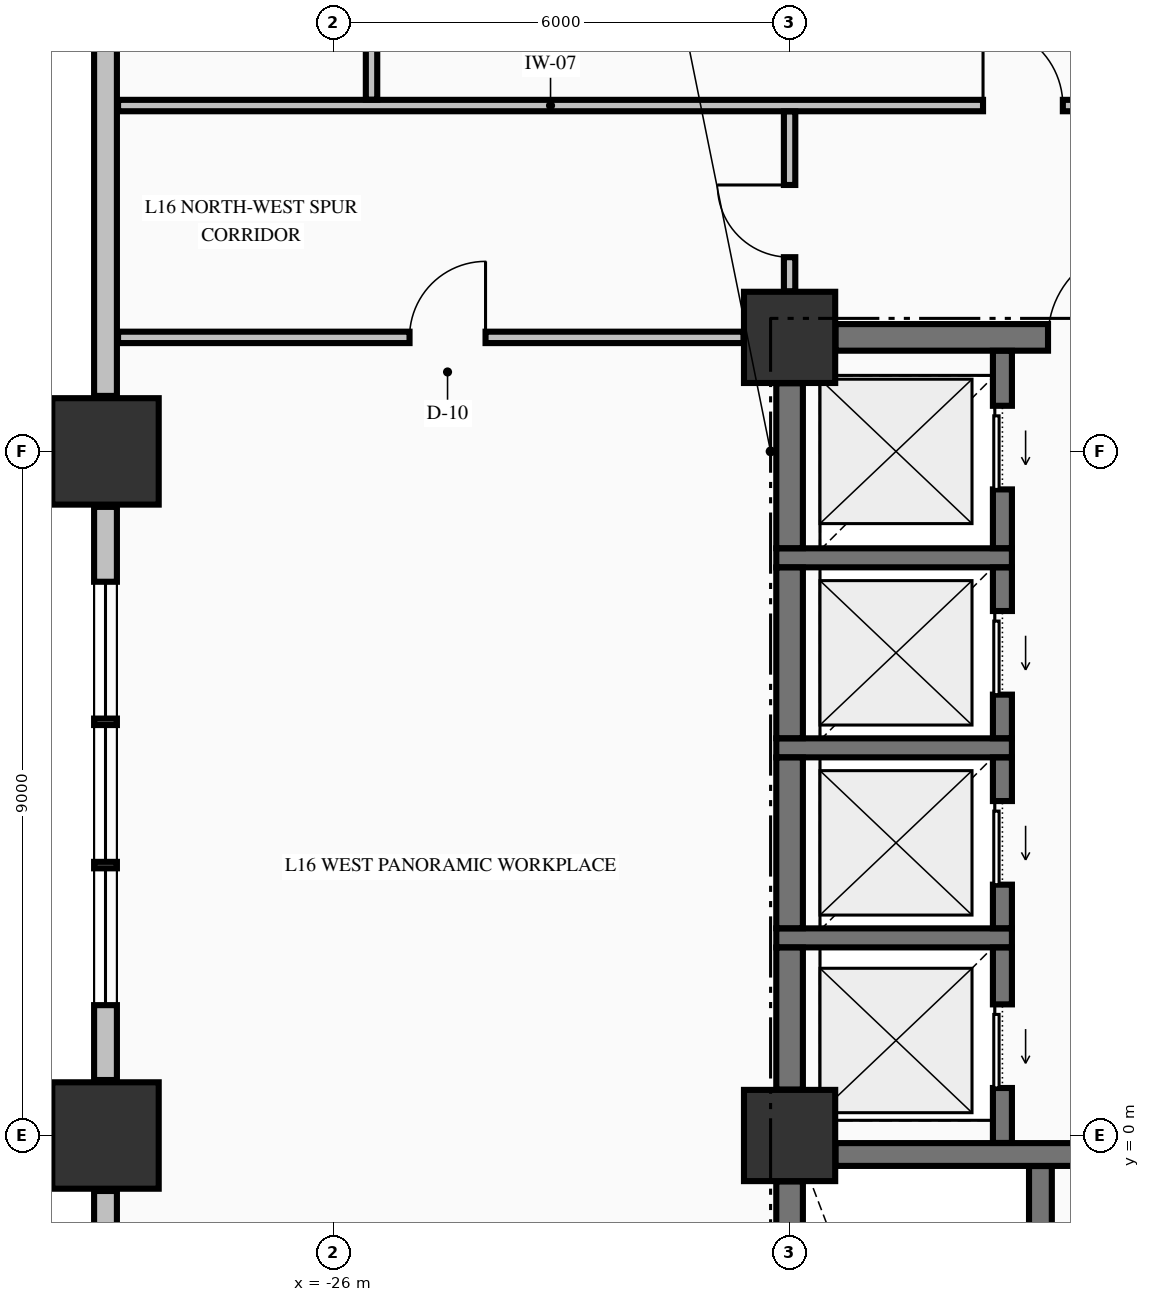
"""IFC4 building model, lengths in metres.
Left out: names, types, materials, properties, quantities, classifications, styles, units other than length and angle.
Written with IfcOpenShell. Run it as: python <this file> out.ifc"""

import sys

from ifc_helpers import new_model, si_unit, direction, frame, frame_2d, origin, origin_2d, place, context, subcontext, project, spatial, rectangle, extrude, element, fill, save


model = new_model("IFC4")
c1 = context("Model", 3, precision=1e-05, world=origin(), true_north=direction((0.0, 1.0)))
c2 = subcontext(c1, "Body", "Model", "MODEL_VIEW")
j1 = project(units=[si_unit("LENGTHUNIT", "METRE"), si_unit("PLANEANGLEUNIT", "RADIAN")], contexts=[c1])
p1 = place(None, origin())
s1 = spatial("IfcSite", under=j1, at=p1, CompositionType="ELEMENT")
p2 = place(p1, origin())
s2 = spatial("IfcBuilding", under=s1, at=p2, CompositionType="ELEMENT")
p3 = place(p2, frame((0.0, 0.0, 67.9)))
s3 = spatial("IfcBuildingStorey", under=s2, at=p3, CompositionType="ELEMENT", Elevation=67.9)
for number, where, z_axis, x_axis in (
    (1, (-29.0, 0.0, -0.25), (0.0, 0.0, 1.0), (1.0, 0.0, 0.0)),
    (2, (-29.0, 9.0, -0.25), (0.0, 0.0, 1.0), (1.0, 0.0, 0.0)),
):
    element("IfcColumn", number, at=place(p3, frame(where, z_axis=z_axis, x_axis=x_axis)), inside=s3, PredefinedType="COLUMN", context=c2, shape_type="SweptSolid", body=[
        extrude(rectangle(XDim=1.4, YDim=1.4, at=origin_2d()), origin(), (0.0, 0.0, 1.0), 3.495),
    ])
for number, where, z_axis, x_axis in (
    (3, (-20.0, 10.5, -0.25), (0.0, 0.0, 1.0), (1.0, 0.0, 0.0)),
    (4, (-20.0, 0.0, -0.25), (0.0, 0.0, 1.0), (1.0, 0.0, 0.0)),
):
    element("IfcColumn", number, at=place(p3, frame(where, z_axis=z_axis, x_axis=x_axis)), inside=s3, PredefinedType="COLUMN", context=c2, shape_type="SweptSolid", body=[
        extrude(rectangle(XDim=1.2, YDim=1.2, at=origin_2d()), origin(), (0.0, 0.0, 1.0), 3.495),
    ])
p4 = place(p3, frame((-29.0, -0.73, 0.0), z_axis=(0.0, 0.0, 1.0), x_axis=(0.0, -1.0, 0.0)))
e5 = element("IfcWall", 5, at=p4, inside=s3, PredefinedType="STANDARD", context=c2, shape_type="SweptSolid", body=[
    extrude(rectangle(XDim=7.54, YDim=0.3, at=frame_2d((3.77, 0.0))), origin(), (0.0, 0.0, 1.0), 2.637),
])
p5 = place(p4, frame((0.985, 0.0, 0.78)))
e6 = element("IfcOpeningElement", 6, at=p5, cuts=e5, PredefinedType="OPENING", context=c2, shape_type="SweptSolid", body=[
    extrude(rectangle(XDim=1.8, YDim=1.72, at=frame_2d((0.9, 0.86))), frame((0.0, 0.16, 0.0), z_axis=(0.0, -1.0, 0.0), x_axis=(1.0, 0.0, 0.0)), (0.0, 0.0, 1.0), 0.32),
])
p6 = place(p4, frame((2.87, 0.0, 0.78)))
e7 = element("IfcOpeningElement", 7, at=p6, cuts=e5, PredefinedType="OPENING", context=c2, shape_type="SweptSolid", body=[
    extrude(rectangle(XDim=1.8, YDim=1.72, at=frame_2d((0.9, 0.86))), frame((0.0, 0.16, 0.0), z_axis=(0.0, -1.0, 0.0), x_axis=(1.0, 0.0, 0.0)), (0.0, 0.0, 1.0), 0.32),
])
p7 = place(p4, frame((4.755, 0.0, 0.78)))
e8 = element("IfcOpeningElement", 8, at=p7, cuts=e5, PredefinedType="OPENING", context=c2, shape_type="SweptSolid", body=[
    extrude(rectangle(XDim=1.8, YDim=1.72, at=frame_2d((0.9, 0.86))), frame((0.0, 0.16, 0.0), z_axis=(0.0, -1.0, 0.0), x_axis=(1.0, 0.0, 0.0)), (0.0, 0.0, 1.0), 0.32),
])
p8 = place(p3, frame((-29.0, 8.27, 0.0), z_axis=(0.0, 0.0, 1.0), x_axis=(0.0, -1.0, 0.0)))
e9 = element("IfcWall", 9, at=p8, inside=s3, PredefinedType="STANDARD", context=c2, shape_type="SweptSolid", body=[
    extrude(rectangle(XDim=7.54, YDim=0.3, at=frame_2d((3.77, 0.0))), origin(), (0.0, 0.0, 1.0), 2.637),
])
p9 = place(p8, frame((0.985, 0.0, 0.78)))
e10 = element("IfcOpeningElement", 10, at=p9, cuts=e9, PredefinedType="OPENING", context=c2, shape_type="SweptSolid", body=[
    extrude(rectangle(XDim=1.8, YDim=1.72, at=frame_2d((0.9, 0.86))), frame((0.0, 0.16, 0.0), z_axis=(0.0, -1.0, 0.0), x_axis=(1.0, 0.0, 0.0)), (0.0, 0.0, 1.0), 0.32),
])
p10 = place(p8, frame((2.87, 0.0, 0.78)))
e11 = element("IfcOpeningElement", 11, at=p10, cuts=e9, PredefinedType="OPENING", context=c2, shape_type="SweptSolid", body=[
    extrude(rectangle(XDim=1.8, YDim=1.72, at=frame_2d((0.9, 0.86))), frame((0.0, 0.16, 0.0), z_axis=(0.0, -1.0, 0.0), x_axis=(1.0, 0.0, 0.0)), (0.0, 0.0, 1.0), 0.32),
])
p11 = place(p8, frame((4.755, 0.0, 0.78)))
e12 = element("IfcOpeningElement", 12, at=p11, cuts=e9, PredefinedType="OPENING", context=c2, shape_type="SweptSolid", body=[
    extrude(rectangle(XDim=1.8, YDim=1.72, at=frame_2d((0.9, 0.86))), frame((0.0, 0.16, 0.0), z_axis=(0.0, -1.0, 0.0), x_axis=(1.0, 0.0, 0.0)), (0.0, 0.0, 1.0), 0.32),
])
p12 = place(p3, frame((-29.0, 22.27, 0.0), z_axis=(0.0, 0.0, 1.0), x_axis=(0.0, -1.0, 0.0)))
e13 = element("IfcWall", 13, at=p12, inside=s3, PredefinedType="STANDARD", context=c2, shape_type="SweptSolid", body=[
    extrude(rectangle(XDim=12.54, YDim=0.3, at=frame_2d((6.27, 0.0))), origin(), (0.0, 0.0, 1.0), 2.637),
])
p13 = place(p3, frame((-19.396, -0.25, 0.0), z_axis=(0.0, 0.0, 1.0), x_axis=(1.0, 0.0, 0.0)))
e14 = element("IfcWall", 14, at=p13, inside=s3, PredefinedType="SHEAR", context=c2, shape_type="SweptSolid", body=[
    extrude(rectangle(XDim=7.792, YDim=0.3, at=frame_2d((3.896, 0.0))), origin(), (0.0, 0.0, 1.0), 3.245),
])
p14 = place(p13, frame((5.696, 0.0, 0.0)))
e15 = element("IfcOpeningElement", 15, at=p14, cuts=e14, PredefinedType="OPENING", context=c2, shape_type="SweptSolid", body=[
    extrude(rectangle(XDim=1.1, YDim=2.15, at=frame_2d((0.55, 1.075))), frame((0.0, 0.16, 0.0), z_axis=(0.0, -1.0, 0.0), x_axis=(1.0, 0.0, 0.0)), (0.0, 0.0, 1.0), 0.32),
])
for number, where, z_axis, x_axis in (
    (16, (-20.175, 2.6, 0.0), (0.0, 0.0, 1.0), (1.0, 0.0, 0.0)),
    (17, (-20.175, 5.1, 0.0), (0.0, 0.0, 1.0), (1.0, 0.0, 0.0)),
    (18, (-20.175, 7.6, 0.0), (0.0, 0.0, 1.0), (1.0, 0.0, 0.0)),
):
    element("IfcWall", number, at=place(p3, frame(where, z_axis=z_axis, x_axis=x_axis)), inside=s3, PredefinedType="SOLIDWALL", context=c2, shape_type="SweptSolid", body=[
        extrude(rectangle(XDim=3.1, YDim=0.25, at=frame_2d((1.55, 0.0))), origin(), (0.0, 0.0, 1.0), 3.245),
    ])
p15 = place(p3, frame((-19.396, 10.5, 0.0), z_axis=(0.0, 0.0, 1.0), x_axis=(1.0, 0.0, 0.0)))
e19 = element("IfcWall", 19, at=p15, inside=s3, PredefinedType="SHEAR", context=c2, shape_type="SweptSolid", body=[
    extrude(rectangle(XDim=4.696, YDim=0.35, at=frame_2d((2.348, 0.0))), origin(), (0.0, 0.0, 1.0), 3.245),
])
p16 = place(p15, frame((2.796, 0.0, 0.0)))
e20 = element("IfcOpeningElement", 20, at=p16, cuts=e19, PredefinedType="OPENING", context=c2, shape_type="SweptSolid", body=[
    extrude(rectangle(XDim=1.2, YDim=2.15, at=frame_2d((0.6, 1.075))), frame((0.0, 0.185, 0.0), z_axis=(0.0, -1.0, 0.0), x_axis=(1.0, 0.0, 0.0)), (0.0, 0.0, 1.0), 0.37),
])
p17 = place(p3, frame((-28.835, 10.5, 0.0), z_axis=(0.0, 0.0, 1.0), x_axis=(1.0, 0.0, 0.0)))
e21 = element("IfcWall", 21, at=p17, inside=s3, PredefinedType="PARTITIONING", context=c2, shape_type="SweptSolid", body=[
    extrude(rectangle(XDim=8.229, YDim=0.15, at=frame_2d((4.115, 0.0))), origin(), (0.0, 0.0, 1.0), 3.245),
])
p18 = place(p17, frame((3.835, 0.0, 0.0)))
e22 = element("IfcOpeningElement", 22, at=p18, cuts=e21, PredefinedType="OPENING", context=c2, shape_type="SweptSolid", body=[
    extrude(rectangle(XDim=1.0, YDim=2.15, at=frame_2d((0.5, 1.075))), frame((0.0, 0.085, 0.0), z_axis=(0.0, -1.0, 0.0), x_axis=(1.0, 0.0, 0.0)), (0.0, 0.0, 1.0), 0.17),
])
p19 = place(p3, frame((-28.835, 13.55, 0.0), z_axis=(0.0, 0.0, 1.0), x_axis=(1.0, 0.0, 0.0)))
e23 = element("IfcWall", 23, at=p19, inside=s3, PredefinedType="PARTITIONING", context=c2, shape_type="SweptSolid", body=[
    extrude(rectangle(XDim=52.67, YDim=0.15, at=frame_2d((26.335, 0.0))), origin(), (0.0, 0.0, 1.0), 3.245),
])
p20 = place(p19, frame((11.38, 0.0, 0.0)))
e24 = element("IfcOpeningElement", 24, at=p20, cuts=e23, PredefinedType="OPENING", context=c2, shape_type="SweptSolid", body=[
    extrude(rectangle(XDim=1.05, YDim=2.15, at=frame_2d((0.525, 1.075))), frame((0.0, 0.085, 0.0), z_axis=(0.0, -1.0, 0.0), x_axis=(1.0, 0.0, 0.0)), (0.0, 0.0, 1.0), 0.17),
])
p21 = place(p19, frame((15.91, 0.0, 0.0)))
e25 = element("IfcOpeningElement", 25, at=p21, cuts=e23, PredefinedType="OPENING", context=c2, shape_type="SweptSolid", body=[
    extrude(rectangle(XDim=1.05, YDim=2.15, at=frame_2d((0.525, 1.075))), frame((0.0, 0.085, 0.0), z_axis=(0.0, -1.0, 0.0), x_axis=(1.0, 0.0, 0.0)), (0.0, 0.0, 1.0), 0.17),
])
p22 = place(p19, frame((26.66, 0.0, 0.0)))
e26 = element("IfcOpeningElement", 26, at=p22, cuts=e23, PredefinedType="OPENING", context=c2, shape_type="SweptSolid", body=[
    extrude(rectangle(XDim=1.05, YDim=2.15, at=frame_2d((0.525, 1.075))), frame((0.0, 0.085, 0.0), z_axis=(0.0, -1.0, 0.0), x_axis=(1.0, 0.0, 0.0)), (0.0, 0.0, 1.0), 0.17),
])
p23 = place(p19, frame((35.56, 0.0, 0.0)))
e27 = element("IfcOpeningElement", 27, at=p23, cuts=e23, PredefinedType="OPENING", context=c2, shape_type="SweptSolid", body=[
    extrude(rectangle(XDim=1.05, YDim=2.15, at=frame_2d((0.525, 1.075))), frame((0.0, 0.085, 0.0), z_axis=(0.0, -1.0, 0.0), x_axis=(1.0, 0.0, 0.0)), (0.0, 0.0, 1.0), 0.17),
])
p24 = place(p19, frame((44.19, 0.0, 0.0)))
e28 = element("IfcOpeningElement", 28, at=p24, cuts=e23, PredefinedType="OPENING", context=c2, shape_type="SweptSolid", body=[
    extrude(rectangle(XDim=1.05, YDim=2.15, at=frame_2d((0.525, 1.075))), frame((0.0, 0.085, 0.0), z_axis=(0.0, -1.0, 0.0), x_axis=(1.0, 0.0, 0.0)), (0.0, 0.0, 1.0), 0.17),
])
p25 = place(p3, frame((-20.0, -9.346, 0.0), z_axis=(0.0, 0.0, 1.0), x_axis=(0.0, 1.0, 0.0)))
e29 = element("IfcWall", 29, at=p25, inside=s3, PredefinedType="SHEAR", context=c2, shape_type="SweptSolid", body=[
    extrude(rectangle(XDim=8.742, YDim=0.35, at=frame_2d((4.371, 0.0))), origin(), (0.0, 0.0, 1.0), 3.245),
])
p26 = place(p3, frame((-20.0, 0.604, 0.0), z_axis=(0.0, 0.0, 1.0), x_axis=(0.0, 1.0, 0.0)))
e30 = element("IfcWall", 30, at=p26, inside=s3, PredefinedType="SHEAR", context=c2, shape_type="SweptSolid", body=[
    extrude(rectangle(XDim=1.869, YDim=0.35, at=frame_2d((0.935, 0.0))), origin(), (0.0, 0.0, 1.0), 3.245),
])
for number, where, z_axis, x_axis in (
    (31, (-20.0, 2.727, 0.0), (0.0, 0.0, 1.0), (0.0, 1.0, 0.0)),
    (32, (-20.0, 5.227, 0.0), (0.0, 0.0, 1.0), (0.0, 1.0, 0.0)),
):
    element("IfcWall", number, at=place(p3, frame(where, z_axis=z_axis, x_axis=x_axis)), inside=s3, PredefinedType="SHEAR", context=c2, shape_type="SweptSolid", body=[
        extrude(rectangle(XDim=2.246, YDim=0.35, at=frame_2d((1.123, 0.0))), origin(), (0.0, 0.0, 1.0), 3.245),
    ])
p27 = place(p3, frame((-20.0, 7.727, 0.0), z_axis=(0.0, 0.0, 1.0), x_axis=(0.0, 1.0, 0.0)))
e33 = element("IfcWall", 33, at=p27, inside=s3, PredefinedType="SHEAR", context=c2, shape_type="SweptSolid", body=[
    extrude(rectangle(XDim=2.169, YDim=0.35, at=frame_2d((1.084, 0.0))), origin(), (0.0, 0.0, 1.0), 3.245),
])
p28 = place(p3, frame((-17.2, -0.098, 0.0), z_axis=(0.0, 0.0, 1.0), x_axis=(0.0, 1.0, 0.0)))
e34 = element("IfcWall", 34, at=p28, inside=s3, PredefinedType="SOLIDWALL", context=c2, shape_type="SweptSolid", body=[
    extrude(rectangle(XDim=2.571, YDim=0.25, at=frame_2d((1.285, 0.0))), origin(), (0.0, 0.0, 1.0), 3.245),
])
p29 = place(p28, frame((0.723, 0.0, 0.0)))
e35 = element("IfcOpeningElement", 35, at=p29, cuts=e34, PredefinedType="OPENING", context=c2, shape_type="SweptSolid", body=[
    extrude(rectangle(XDim=1.1, YDim=2.2, at=frame_2d((0.55, 1.1))), frame((0.0, 0.135, 0.0), z_axis=(0.0, -1.0, 0.0), x_axis=(1.0, 0.0, 0.0)), (0.0, 0.0, 1.0), 0.27),
])
p30 = place(p3, frame((-17.2, 2.727, 0.0), z_axis=(0.0, 0.0, 1.0), x_axis=(0.0, 1.0, 0.0)))
e36 = element("IfcWall", 36, at=p30, inside=s3, PredefinedType="SOLIDWALL", context=c2, shape_type="SweptSolid", body=[
    extrude(rectangle(XDim=2.246, YDim=0.25, at=frame_2d((1.123, 0.0))), origin(), (0.0, 0.0, 1.0), 3.245),
])
p31 = place(p30, frame((0.573, 0.0, 0.0)))
e37 = element("IfcOpeningElement", 37, at=p31, cuts=e36, PredefinedType="OPENING", context=c2, shape_type="SweptSolid", body=[
    extrude(rectangle(XDim=1.1, YDim=2.2, at=frame_2d((0.55, 1.1))), frame((0.0, 0.135, 0.0), z_axis=(0.0, -1.0, 0.0), x_axis=(1.0, 0.0, 0.0)), (0.0, 0.0, 1.0), 0.27),
])
p32 = place(p3, frame((-17.2, 5.227, 0.0), z_axis=(0.0, 0.0, 1.0), x_axis=(0.0, 1.0, 0.0)))
e38 = element("IfcWall", 38, at=p32, inside=s3, PredefinedType="SOLIDWALL", context=c2, shape_type="SweptSolid", body=[
    extrude(rectangle(XDim=2.246, YDim=0.25, at=frame_2d((1.123, 0.0))), origin(), (0.0, 0.0, 1.0), 3.245),
])
p33 = place(p32, frame((0.573, 0.0, 0.0)))
e39 = element("IfcOpeningElement", 39, at=p33, cuts=e38, PredefinedType="OPENING", context=c2, shape_type="SweptSolid", body=[
    extrude(rectangle(XDim=1.1, YDim=2.2, at=frame_2d((0.55, 1.1))), frame((0.0, 0.135, 0.0), z_axis=(0.0, -1.0, 0.0), x_axis=(1.0, 0.0, 0.0)), (0.0, 0.0, 1.0), 0.27),
])
p34 = place(p3, frame((-17.2, 7.727, 0.0), z_axis=(0.0, 0.0, 1.0), x_axis=(0.0, 1.0, 0.0)))
e40 = element("IfcWall", 40, at=p34, inside=s3, PredefinedType="SOLIDWALL", context=c2, shape_type="SweptSolid", body=[
    extrude(rectangle(XDim=2.596, YDim=0.25, at=frame_2d((1.298, 0.0))), origin(), (0.0, 0.0, 1.0), 3.245),
])
p35 = place(p34, frame((0.773, 0.0, 0.0)))
e41 = element("IfcOpeningElement", 41, at=p35, cuts=e40, PredefinedType="OPENING", context=c2, shape_type="SweptSolid", body=[
    extrude(rectangle(XDim=1.1, YDim=2.2, at=frame_2d((0.55, 1.1))), frame((0.0, 0.135, 0.0), z_axis=(0.0, -1.0, 0.0), x_axis=(1.0, 0.0, 0.0)), (0.0, 0.0, 1.0), 0.27),
])
p36 = place(p3, frame((-16.7, -9.773, 0.0), z_axis=(0.0, 0.0, 1.0), x_axis=(0.0, 1.0, 0.0)))
e42 = element("IfcWall", 42, at=p36, inside=s3, PredefinedType="SHEAR", context=c2, shape_type="SweptSolid", body=[
    extrude(rectangle(XDim=9.371, YDim=0.3, at=frame_2d((4.686, 0.0))), origin(), (0.0, 0.0, 1.0), 3.245),
])
p37 = place(p3, frame((-25.5, 13.628, 0.0), z_axis=(0.0, 0.0, 1.0), x_axis=(0.0, 1.0, 0.0)))
e43 = element("IfcWall", 43, at=p37, inside=s3, PredefinedType="PARTITIONING", context=c2, shape_type="SweptSolid", body=[
    extrude(rectangle(XDim=8.666, YDim=0.15, at=frame_2d((4.333, 0.0))), origin(), (0.0, 0.0, 1.0), 3.245),
])
p38 = place(p3, frame((-20.0, 11.106, 0.0), z_axis=(0.0, 0.0, 1.0), x_axis=(0.0, 1.0, 0.0)))
e44 = element("IfcWall", 44, at=p38, inside=s3, PredefinedType="PARTITIONING", context=c2, shape_type="SweptSolid", body=[
    extrude(rectangle(XDim=2.366, YDim=0.15, at=frame_2d((1.183, 0.0))), origin(), (0.0, 0.0, 1.0), 2.585),
])
p39 = place(p38, frame((0.449, 0.0, 0.0)))
e45 = element("IfcOpeningElement", 45, at=p39, cuts=e44, PredefinedType="OPENING", context=c2, shape_type="SweptSolid", body=[
    extrude(rectangle(XDim=0.95, YDim=2.15, at=frame_2d((0.475, 1.075))), frame((0.0, 0.085, 0.0), z_axis=(0.0, -1.0, 0.0), x_axis=(1.0, 0.0, 0.0)), (0.0, 0.0, 1.0), 0.17),
])
p40 = place(p9, origin())
e46 = element("IfcWindow", 46, at=p40, inside=s3, PartitioningType="SINGLE_PANEL", PredefinedType="WINDOW", context=c2, shape_type="SweptSolid", body=[
    extrude(rectangle(XDim=1.8, YDim=1.72, at=frame_2d((0.9, 0.86))), frame((0.0, 0.03, 0.0), z_axis=(0.0, -1.0, 0.0), x_axis=(1.0, 0.0, 0.0)), (0.0, 0.0, 1.0), 0.06),
])
fill(e10, e46)
p41 = place(p10, origin())
e47 = element("IfcWindow", 47, at=p41, inside=s3, PartitioningType="SINGLE_PANEL", PredefinedType="WINDOW", context=c2, shape_type="SweptSolid", body=[
    extrude(rectangle(XDim=1.8, YDim=1.72, at=frame_2d((0.9, 0.86))), frame((0.0, 0.03, 0.0), z_axis=(0.0, -1.0, 0.0), x_axis=(1.0, 0.0, 0.0)), (0.0, 0.0, 1.0), 0.06),
])
fill(e11, e47)
p42 = place(p11, origin())
e48 = element("IfcWindow", 48, at=p42, inside=s3, PartitioningType="SINGLE_PANEL", PredefinedType="WINDOW", context=c2, shape_type="SweptSolid", body=[
    extrude(rectangle(XDim=1.8, YDim=1.72, at=frame_2d((0.9, 0.86))), frame((0.0, 0.03, 0.0), z_axis=(0.0, -1.0, 0.0), x_axis=(1.0, 0.0, 0.0)), (0.0, 0.0, 1.0), 0.06),
])
fill(e12, e48)
p43 = place(p16, origin())
e49 = element("IfcDoor", 49, at=p43, inside=s3, OperationType="SINGLE_SWING_RIGHT", PredefinedType="DOOR", context=c2, shape_type="SweptSolid", body=[
    extrude(rectangle(XDim=1.2, YDim=2.15, at=frame_2d((0.6, 1.075))), frame((0.0, 0.025, 0.0), z_axis=(0.0, -1.0, 0.0), x_axis=(1.0, 0.0, 0.0)), (0.0, 0.0, 1.0), 0.05),
])
fill(e20, e49)
p44 = place(p29, origin())
e50 = element("IfcDoor", 50, at=p44, inside=s3, OperationType="SLIDING_TO_LEFT", PredefinedType="DOOR", context=c2, shape_type="SweptSolid", body=[
    extrude(rectangle(XDim=1.1, YDim=2.2, at=frame_2d((0.55, 1.1))), frame((0.0, 0.025, 0.0), z_axis=(0.0, -1.0, 0.0), x_axis=(1.0, 0.0, 0.0)), (0.0, 0.0, 1.0), 0.05),
])
fill(e35, e50)
p45 = place(p31, origin())
e51 = element("IfcDoor", 51, at=p45, inside=s3, OperationType="SLIDING_TO_LEFT", PredefinedType="DOOR", context=c2, shape_type="SweptSolid", body=[
    extrude(rectangle(XDim=1.1, YDim=2.2, at=frame_2d((0.55, 1.1))), frame((0.0, 0.025, 0.0), z_axis=(0.0, -1.0, 0.0), x_axis=(1.0, 0.0, 0.0)), (0.0, 0.0, 1.0), 0.05),
])
fill(e37, e51)
p46 = place(p33, origin())
e52 = element("IfcDoor", 52, at=p46, inside=s3, OperationType="SLIDING_TO_LEFT", PredefinedType="DOOR", context=c2, shape_type="SweptSolid", body=[
    extrude(rectangle(XDim=1.1, YDim=2.2, at=frame_2d((0.55, 1.1))), frame((0.0, 0.025, 0.0), z_axis=(0.0, -1.0, 0.0), x_axis=(1.0, 0.0, 0.0)), (0.0, 0.0, 1.0), 0.05),
])
fill(e39, e52)
p47 = place(p35, origin())
e53 = element("IfcDoor", 53, at=p47, inside=s3, OperationType="SLIDING_TO_LEFT", PredefinedType="DOOR", context=c2, shape_type="SweptSolid", body=[
    extrude(rectangle(XDim=1.1, YDim=2.2, at=frame_2d((0.55, 1.1))), frame((0.0, 0.025, 0.0), z_axis=(0.0, -1.0, 0.0), x_axis=(1.0, 0.0, 0.0)), (0.0, 0.0, 1.0), 0.05),
])
fill(e41, e53)
p48 = place(p20, origin())
e54 = element("IfcDoor", 54, at=p48, inside=s3, OperationType="SINGLE_SWING_LEFT", PredefinedType="DOOR", context=c2, shape_type="SweptSolid", body=[
    extrude(rectangle(XDim=1.05, YDim=2.15, at=frame_2d((0.525, 1.075))), frame((0.0, 0.025, 0.0), z_axis=(0.0, -1.0, 0.0), x_axis=(1.0, 0.0, 0.0)), (0.0, 0.0, 1.0), 0.05),
])
fill(e24, e54)
p49 = place(p39, origin())
e55 = element("IfcDoor", 55, at=p49, inside=s3, OperationType="SINGLE_SWING_RIGHT", PredefinedType="DOOR", context=c2, shape_type="SweptSolid", body=[
    extrude(rectangle(XDim=0.95, YDim=2.15, at=frame_2d((0.475, 1.075))), frame((0.0, 0.025, 0.0), z_axis=(0.0, -1.0, 0.0), x_axis=(1.0, 0.0, 0.0)), (0.0, 0.0, 1.0), 0.05),
])
fill(e45, e55)
p50 = place(p18, origin())
e56 = element("IfcDoor", 56, at=p50, inside=s3, OperationType="SINGLE_SWING_RIGHT", PredefinedType="DOOR", context=c2, shape_type="SweptSolid", body=[
    extrude(rectangle(XDim=1.0, YDim=2.15, at=frame_2d((0.5, 1.075))), frame((0.0, 0.025, 0.0), z_axis=(0.0, -1.0, 0.0), x_axis=(1.0, 0.0, 0.0)), (0.0, 0.0, 1.0), 0.05),
])
fill(e22, e56)
save(model, sys.argv[1])
